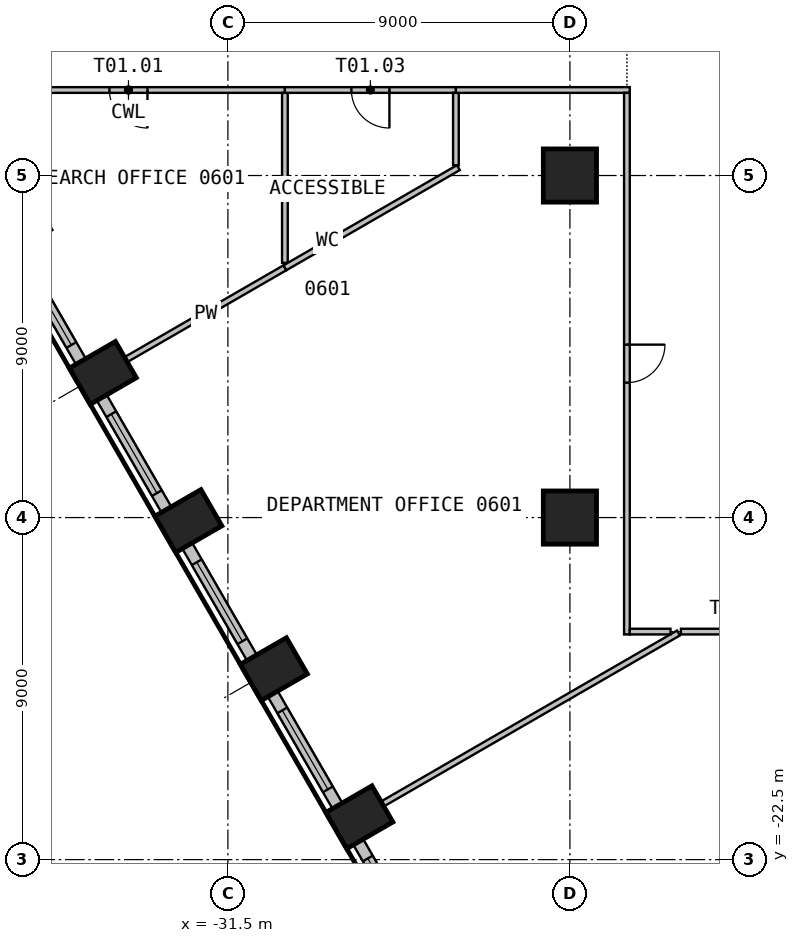
"""IFC4 building model, lengths in metres.
Left out: names, types, materials, properties, quantities, classifications, styles, units other than length and angle.
Written with IfcOpenShell. Run it as: python <this file> out.ifc"""

import sys

from ifc_helpers import new_model, si_unit, direction, frame, frame_2d, origin, origin_2d, place, context, subcontext, project, spatial, rectangle, circle, extrude, element, fill, save


model = new_model("IFC4")
c1 = context("Model", 3, precision=1e-05, world=origin(), true_north=direction((0.0, 1.0)))
c2 = subcontext(c1, "Body", "Model", "MODEL_VIEW")
j1 = project(units=[si_unit("LENGTHUNIT", "METRE"), si_unit("PLANEANGLEUNIT", "RADIAN")], contexts=[c1])
p1 = place(None, origin())
s1 = spatial("IfcSite", under=j1, at=p1, CompositionType="ELEMENT")
p2 = place(p1, origin())
s2 = spatial("IfcBuilding", under=s1, at=p2, CompositionType="ELEMENT")
p3 = place(p2, frame((0.0, 0.0, 30.0)))
s3 = spatial("IfcBuildingStorey", under=s2, at=p3, CompositionType="ELEMENT", Elevation=30.0)
for number, where, z_axis, x_axis in (
    (1, (-34.791, -9.694, 0.0), (0.0, 0.0, 1.0), (0.5, -0.866, 0.0)),
    (2, (-32.541, -13.591, 0.0), (0.0, 0.0, 1.0), (0.5, -0.866, 0.0)),
    (3, (-30.291, -17.489, 0.0), (0.0, 0.0, 1.0), (0.5, -0.866, 0.0)),
    (4, (-28.041, -21.385, 0.0), (0.0, 0.0, 1.0), (0.5, -0.866, 0.0)),
):
    element("IfcColumn", number, at=place(p3, frame(where, z_axis=z_axis, x_axis=x_axis)), inside=s3, PredefinedType="COLUMN", context=c2, shape_type="SweptSolid", body=[
        extrude(rectangle(XDim=1.1, YDim=1.4, at=origin_2d()), origin(), (0.0, 0.0, 1.0), 3.525),
    ])
for number, where, z_axis, x_axis in (
    (5, (-22.5, -13.5, 0.0), (0.0, 0.0, 1.0), (1.0, 0.0, 0.0)),
    (6, (-22.5, -4.5, 0.0), (0.0, 0.0, 1.0), (1.0, 0.0, 0.0)),
):
    element("IfcColumn", number, at=place(p3, frame(where, z_axis=z_axis, x_axis=x_axis)), inside=s3, PredefinedType="COLUMN", context=c2, shape_type="SweptSolid", body=[
        extrude(circle(Radius=0.7, at=origin_2d()), origin(), (0.0, 0.0, 1.0), 3.525),
    ])
p4 = place(p3, frame((-37.069, -6.449, 0.0), z_axis=(0.0, 0.0, 1.0), x_axis=(0.499993955907, -0.866028893315, 0.0)))
e7 = element("IfcWall", 7, at=p4, inside=s3, PredefinedType="SOLIDWALL", context=c2, shape_type="SweptSolid", body=[
    extrude(rectangle(XDim=3.399, YDim=0.3, at=frame_2d((1.699, 0.0))), origin(), (0.0, 0.0, 1.0), 3.525),
])
p5 = place(p4, frame((0.5, 0.0, 0.9)))
e8 = element("IfcOpeningElement", 8, at=p5, cuts=e7, PredefinedType="OPENING", context=c2, shape_type="SweptSolid", body=[
    extrude(rectangle(XDim=2.4, YDim=2.1, at=frame_2d((1.2, 1.05))), frame((0.0, 0.16, 0.0), z_axis=(0.0, -1.0, 0.0), x_axis=(1.0, 0.0, 0.0)), (0.0, 0.0, 1.0), 0.32),
])
p6 = place(p3, frame((-34.819, -10.346, 0.0), z_axis=(0.0, 0.0, 1.0), x_axis=(0.499993955907, -0.866028893315, 0.0)))
e9 = element("IfcWall", 9, at=p6, inside=s3, PredefinedType="SOLIDWALL", context=c2, shape_type="SweptSolid", body=[
    extrude(rectangle(XDim=3.399, YDim=0.3, at=frame_2d((1.699, 0.0))), origin(), (0.0, 0.0, 1.0), 3.525),
])
p7 = place(p6, frame((0.5, 0.0, 0.9)))
e10 = element("IfcOpeningElement", 10, at=p7, cuts=e9, PredefinedType="OPENING", context=c2, shape_type="SweptSolid", body=[
    extrude(rectangle(XDim=2.4, YDim=2.1, at=frame_2d((1.2, 1.05))), frame((0.0, 0.16, 0.0), z_axis=(0.0, -1.0, 0.0), x_axis=(1.0, 0.0, 0.0)), (0.0, 0.0, 1.0), 0.32),
])
p8 = place(p3, frame((-32.569, -14.243, 0.0), z_axis=(0.0, 0.0, 1.0), x_axis=(0.499993955907, -0.866028893315, 0.0)))
e11 = element("IfcWall", 11, at=p8, inside=s3, PredefinedType="SOLIDWALL", context=c2, shape_type="SweptSolid", body=[
    extrude(rectangle(XDim=3.399, YDim=0.3, at=frame_2d((1.699, 0.0))), origin(), (0.0, 0.0, 1.0), 3.525),
])
p9 = place(p8, frame((0.5, 0.0, 0.9)))
e12 = element("IfcOpeningElement", 12, at=p9, cuts=e11, PredefinedType="OPENING", context=c2, shape_type="SweptSolid", body=[
    extrude(rectangle(XDim=2.4, YDim=2.1, at=frame_2d((1.2, 1.05))), frame((0.0, 0.16, 0.0), z_axis=(0.0, -1.0, 0.0), x_axis=(1.0, 0.0, 0.0)), (0.0, 0.0, 1.0), 0.32),
])
p10 = place(p3, frame((-30.319, -18.14, 0.0), z_axis=(0.0, 0.0, 1.0), x_axis=(0.499993955907, -0.866028893315, 0.0)))
e13 = element("IfcWall", 13, at=p10, inside=s3, PredefinedType="SOLIDWALL", context=c2, shape_type="SweptSolid", body=[
    extrude(rectangle(XDim=3.399, YDim=0.3, at=frame_2d((1.699, 0.0))), origin(), (0.0, 0.0, 1.0), 3.525),
])
p11 = place(p10, frame((0.5, 0.0, 0.9)))
e14 = element("IfcOpeningElement", 14, at=p11, cuts=e13, PredefinedType="OPENING", context=c2, shape_type="SweptSolid", body=[
    extrude(rectangle(XDim=2.4, YDim=2.1, at=frame_2d((1.2, 1.05))), frame((0.0, 0.16, 0.0), z_axis=(0.0, -1.0, 0.0), x_axis=(1.0, 0.0, 0.0)), (0.0, 0.0, 1.0), 0.32),
])
p12 = place(p3, frame((-28.069, -22.037, 0.0), z_axis=(0.0, 0.0, 1.0), x_axis=(0.499993955907, -0.866028893315, 0.0)))
e15 = element("IfcWall", 15, at=p12, inside=s3, PredefinedType="SOLIDWALL", context=c2, shape_type="SweptSolid", body=[
    extrude(rectangle(XDim=3.399, YDim=0.3, at=frame_2d((1.699, 0.0))), origin(), (0.0, 0.0, 1.0), 3.525),
])
p13 = place(p12, frame((0.5, 0.0, 0.9)))
e16 = element("IfcOpeningElement", 16, at=p13, cuts=e15, PredefinedType="OPENING", context=c2, shape_type="SweptSolid", body=[
    extrude(rectangle(XDim=2.4, YDim=2.1, at=frame_2d((1.2, 1.05))), frame((0.0, 0.16, 0.0), z_axis=(0.0, -1.0, 0.0), x_axis=(1.0, 0.0, 0.0)), (0.0, 0.0, 1.0), 0.32),
])
p14 = place(p3, frame((-30.0, -2.25, 0.0), z_axis=(0.0, 0.0, 1.0), x_axis=(-1.0, 0.0, 0.0)))
e17 = element("IfcWall", 17, at=p14, inside=s3, PredefinedType="PARTITIONING", context=c2, shape_type="SweptSolid", body=[
    extrude(rectangle(XDim=8.233, YDim=0.15, at=frame_2d((4.116, 0.0))), origin(), (0.0, 0.0, 1.0), 3.525),
])
p15 = place(p14, frame((3.616, 0.0, 0.0)))
e18 = element("IfcOpeningElement", 18, at=p15, cuts=e17, PredefinedType="OPENING", context=c2, shape_type="SweptSolid", body=[
    extrude(rectangle(XDim=1.0, YDim=2.1, at=frame_2d((0.5, 1.05))), frame((0.0, 0.085, 0.0), z_axis=(0.0, -1.0, 0.0), x_axis=(1.0, 0.0, 0.0)), (0.0, 0.0, 1.0), 0.17),
])
p16 = place(p3, frame((-30.0, -6.928, 0.0), z_axis=(0.0, 0.0, 1.0), x_axis=(-0.866011543723, -0.500024005562, 0.0)))
e19 = element("IfcWall", 19, at=p16, inside=s3, PredefinedType="PARTITIONING", context=c2, shape_type="SweptSolid", body=[
    extrude(rectangle(XDim=4.812, YDim=0.15, at=frame_2d((2.406, 0.0))), origin(), (0.0, 0.0, 1.0), 3.525),
])
p17 = place(p3, frame((-30.0, -2.325, 0.0), z_axis=(0.0, 0.0, 1.0), x_axis=(0.0, -1.0, 0.0)))
e20 = element("IfcWall", 20, at=p17, inside=s3, PredefinedType="PARTITIONING", context=c2, shape_type="SweptSolid", body=[
    extrude(rectangle(XDim=4.473, YDim=0.15, at=frame_2d((2.237, 0.0))), origin(), (0.0, 0.0, 1.0), 3.525),
])
p18 = place(p3, frame((-25.435, -4.292, 0.0), z_axis=(0.0, 0.0, 1.0), x_axis=(-0.866031326857, -0.499989740797, 0.0)))
e21 = element("IfcWall", 21, at=p18, inside=s3, PredefinedType="PARTITIONING", context=c2, shape_type="SweptSolid", body=[
    extrude(rectangle(XDim=5.271, YDim=0.15, at=frame_2d((2.635, 0.0))), origin(), (0.0, 0.0, 1.0), 3.525),
])
p19 = place(p3, frame((-25.5, -2.25, 0.0), z_axis=(0.0, 0.0, 1.0), x_axis=(-1.0, 0.0, 0.0)))
e22 = element("IfcWall", 22, at=p19, inside=s3, PredefinedType="PARTITIONING", context=c2, shape_type="SweptSolid", body=[
    extrude(rectangle(XDim=4.5, YDim=0.15, at=frame_2d((2.25, 0.0))), origin(), (0.0, 0.0, 1.0), 3.525),
])
p20 = place(p19, frame((1.75, 0.0, 0.0)))
e23 = element("IfcOpeningElement", 23, at=p20, cuts=e22, PredefinedType="OPENING", context=c2, shape_type="SweptSolid", body=[
    extrude(rectangle(XDim=1.0, YDim=2.1, at=frame_2d((0.5, 1.05))), frame((0.0, 0.085, 0.0), z_axis=(0.0, -1.0, 0.0), x_axis=(1.0, 0.0, 0.0)), (0.0, 0.0, 1.0), 0.17),
])
p21 = place(p3, frame((-19.644, -16.538, 0.0), z_axis=(0.0, 0.0, 1.0), x_axis=(-0.866004853516, -0.500035592419, 0.0)))
e24 = element("IfcWall", 24, at=p21, inside=s3, PredefinedType="PARTITIONING", context=c2, shape_type="SweptSolid", body=[
    extrude(rectangle(XDim=8.976, YDim=0.15, at=frame_2d((4.488, 0.0))), origin(), (0.0, 0.0, 1.0), 3.525),
])
p22 = place(p3, frame((-25.5, -2.325, 0.0), z_axis=(0.0, 0.0, 1.0), x_axis=(0.0, -1.0, 0.0)))
e25 = element("IfcWall", 25, at=p22, inside=s3, PredefinedType="PARTITIONING", context=c2, shape_type="SweptSolid", body=[
    extrude(rectangle(XDim=1.905, YDim=0.15, at=frame_2d((0.953, 0.0))), origin(), (0.0, 0.0, 1.0), 3.525),
])
p23 = place(p3, frame((-20.925, -2.25, 0.0), z_axis=(0.0, 0.0, 1.0), x_axis=(-1.0, 0.0, 0.0)))
e26 = element("IfcWall", 26, at=p23, inside=s3, PredefinedType="PARTITIONING", context=c2, shape_type="SweptSolid", body=[
    extrude(rectangle(XDim=4.575, YDim=0.15, at=frame_2d((2.288, 0.0))), origin(), (0.0, 0.0, 1.0), 3.525),
])
p24 = place(p3, frame((-21.0, -2.325, 0.0), z_axis=(0.0, 0.0, 1.0), x_axis=(0.0, -1.0, 0.0)))
e27 = element("IfcWall", 27, at=p24, inside=s3, PredefinedType="PARTITIONING", context=c2, shape_type="SweptSolid", body=[
    extrude(rectangle(XDim=14.25, YDim=0.15, at=frame_2d((7.125, 0.0))), origin(), (0.0, 0.0, 1.0), 3.525),
])
p25 = place(p24, frame((6.625, 0.0, 0.0)))
e28 = element("IfcOpeningElement", 28, at=p25, cuts=e27, PredefinedType="OPENING", context=c2, shape_type="SweptSolid", body=[
    extrude(rectangle(XDim=1.0, YDim=2.1, at=frame_2d((0.5, 1.05))), frame((0.0, 0.085, 0.0), z_axis=(0.0, -1.0, 0.0), x_axis=(1.0, 0.0, 0.0)), (0.0, 0.0, 1.0), 0.17),
])
p26 = place(p3, frame((-20.925, -16.5, 0.0), z_axis=(0.0, 0.0, 1.0), x_axis=(1.0, 0.0, 0.0)))
e29 = element("IfcWall", 29, at=p26, inside=s3, PredefinedType="PARTITIONING", context=c2, shape_type="SweptSolid", body=[
    extrude(rectangle(XDim=1.071, YDim=0.15, at=frame_2d((0.536, 0.0))), origin(), (0.0, 0.0, 1.0), 3.525),
])
p27 = place(p3, frame((-16.175, -16.573, 0.0), z_axis=(0.0, 0.0, 1.0), x_axis=(-0.258833057728, -0.965922071508, 0.0)))
e30 = element("IfcWall", 30, at=p27, inside=s3, PredefinedType="PARTITIONING", context=c2, shape_type="SweptSolid", body=[
    extrude(rectangle(XDim=14.136, YDim=0.15, at=frame_2d((7.068, 0.0))), origin(), (0.0, 0.0, 1.0), 3.525),
])
p28 = place(p3, frame((-19.579, -16.5, 0.0), z_axis=(0.0, 0.0, 1.0), x_axis=(1.0, 0.0, 0.0)))
e31 = element("IfcWall", 31, at=p28, inside=s3, PredefinedType="PARTITIONING", context=c2, shape_type="SweptSolid", body=[
    extrude(rectangle(XDim=3.328, YDim=0.15, at=frame_2d((1.664, 0.0))), origin(), (0.0, 0.0, 1.0), 3.525),
])
p29 = place(p28, frame((1.164, 0.0, 0.0)))
e32 = element("IfcOpeningElement", 32, at=p29, cuts=e31, PredefinedType="OPENING", context=c2, shape_type="SweptSolid", body=[
    extrude(rectangle(XDim=1.0, YDim=2.1, at=frame_2d((0.5, 1.05))), frame((0.0, 0.085, 0.0), z_axis=(0.0, -1.0, 0.0), x_axis=(1.0, 0.0, 0.0)), (0.0, 0.0, 1.0), 0.17),
])
p30 = place(p5, origin())
e33 = element("IfcWindow", 33, at=p30, inside=s3, PartitioningType="SINGLE_PANEL", PredefinedType="WINDOW", context=c2, shape_type="SweptSolid", body=[
    extrude(rectangle(XDim=2.4, YDim=2.1, at=frame_2d((1.2, 1.05))), frame((0.0, 0.03, 0.0), z_axis=(0.0, -1.0, 0.0), x_axis=(1.0, 0.0, 0.0)), (0.0, 0.0, 1.0), 0.06),
])
fill(e8, e33)
p31 = place(p7, origin())
e34 = element("IfcWindow", 34, at=p31, inside=s3, PartitioningType="SINGLE_PANEL", PredefinedType="WINDOW", context=c2, shape_type="SweptSolid", body=[
    extrude(rectangle(XDim=2.4, YDim=2.1, at=frame_2d((1.2, 1.05))), frame((0.0, 0.03, 0.0), z_axis=(0.0, -1.0, 0.0), x_axis=(1.0, 0.0, 0.0)), (0.0, 0.0, 1.0), 0.06),
])
fill(e10, e34)
p32 = place(p9, origin())
e35 = element("IfcWindow", 35, at=p32, inside=s3, PartitioningType="SINGLE_PANEL", PredefinedType="WINDOW", context=c2, shape_type="SweptSolid", body=[
    extrude(rectangle(XDim=2.4, YDim=2.1, at=frame_2d((1.2, 1.05))), frame((0.0, 0.03, 0.0), z_axis=(0.0, -1.0, 0.0), x_axis=(1.0, 0.0, 0.0)), (0.0, 0.0, 1.0), 0.06),
])
fill(e12, e35)
p33 = place(p11, origin())
e36 = element("IfcWindow", 36, at=p33, inside=s3, PartitioningType="SINGLE_PANEL", PredefinedType="WINDOW", context=c2, shape_type="SweptSolid", body=[
    extrude(rectangle(XDim=2.4, YDim=2.1, at=frame_2d((1.2, 1.05))), frame((0.0, 0.03, 0.0), z_axis=(0.0, -1.0, 0.0), x_axis=(1.0, 0.0, 0.0)), (0.0, 0.0, 1.0), 0.06),
])
fill(e14, e36)
p34 = place(p13, origin())
e37 = element("IfcWindow", 37, at=p34, inside=s3, PartitioningType="SINGLE_PANEL", PredefinedType="WINDOW", context=c2, shape_type="SweptSolid", body=[
    extrude(rectangle(XDim=2.4, YDim=2.1, at=frame_2d((1.2, 1.05))), frame((0.0, 0.03, 0.0), z_axis=(0.0, -1.0, 0.0), x_axis=(1.0, 0.0, 0.0)), (0.0, 0.0, 1.0), 0.06),
])
fill(e16, e37)
p35 = place(p15, origin())
e38 = element("IfcDoor", 38, at=p35, inside=s3, OperationType="SINGLE_SWING_RIGHT", PredefinedType="DOOR", context=c2, shape_type="SweptSolid", body=[
    extrude(rectangle(XDim=1.0, YDim=2.1, at=frame_2d((0.5, 1.05))), frame((0.0, 0.025, 0.0), z_axis=(0.0, -1.0, 0.0), x_axis=(1.0, 0.0, 0.0)), (0.0, 0.0, 1.0), 0.05),
])
fill(e18, e38)
p36 = place(p20, origin())
e39 = element("IfcDoor", 39, at=p36, inside=s3, OperationType="SINGLE_SWING_RIGHT", PredefinedType="DOOR", context=c2, shape_type="SweptSolid", body=[
    extrude(rectangle(XDim=1.0, YDim=2.1, at=frame_2d((0.5, 1.05))), frame((0.0, 0.025, 0.0), z_axis=(0.0, -1.0, 0.0), x_axis=(1.0, 0.0, 0.0)), (0.0, 0.0, 1.0), 0.05),
])
fill(e23, e39)
p37 = place(p25, origin())
e40 = element("IfcDoor", 40, at=p37, inside=s3, OperationType="SINGLE_SWING_LEFT", PredefinedType="DOOR", context=c2, shape_type="SweptSolid", body=[
    extrude(rectangle(XDim=1.0, YDim=2.1, at=frame_2d((0.5, 1.05))), frame((0.0, 0.025, 0.0), z_axis=(0.0, -1.0, 0.0), x_axis=(1.0, 0.0, 0.0)), (0.0, 0.0, 1.0), 0.05),
])
fill(e28, e40)
save(model, sys.argv[1])
